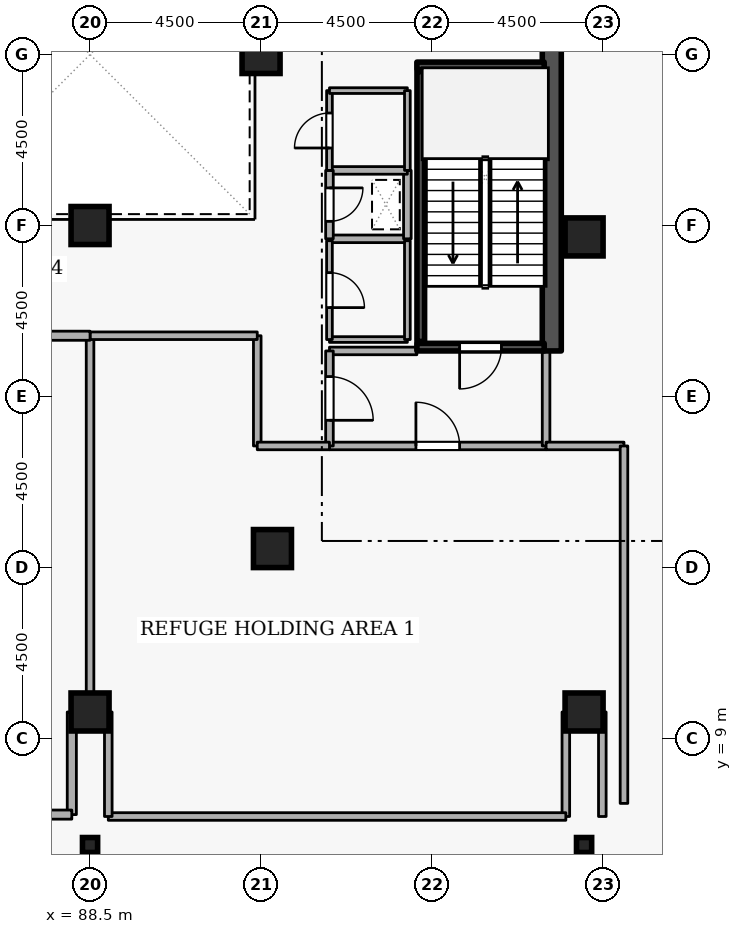
"""IFC4 building model, lengths in metres.
Left out: names, types, materials, properties, quantities, classifications, styles, units other than length and angle.
Written with IfcOpenShell. Run it as: python <this file> out.ifc"""

import sys

from ifc_helpers import new_model, si_unit, direction, frame, frame_2d, origin, origin_2d, place, context, subcontext, project, spatial, rectangle, i_section, extrude, element, fill, save


model = new_model("IFC4")
c1 = context("Model", 3, precision=1e-05, world=origin(), true_north=direction((0.0, 1.0)))
c2 = subcontext(c1, "Body", "Model", "MODEL_VIEW")
j1 = project(units=[si_unit("LENGTHUNIT", "METRE"), si_unit("PLANEANGLEUNIT", "RADIAN")], contexts=[c1])
p1 = place(None, origin())
s1 = spatial("IfcSite", under=j1, at=p1, CompositionType="ELEMENT")
p2 = place(p1, origin())
s2 = spatial("IfcBuilding", under=s1, at=p2, CompositionType="ELEMENT")
p3 = place(p2, frame((0.0, 0.0, 221.7)))
s3 = spatial("IfcBuildingStorey", under=s2, at=p3, CompositionType="ELEMENT", Elevation=221.7)
p4 = place(p3, frame((100.65, 19.2, 0.0), z_axis=(0.0, 0.0, 1.0), x_axis=(0.0, 1.0, 0.0)))
e1 = element("IfcWall", 1, at=p4, inside=s3, PredefinedType="SHEAR", context=c2, shape_type="SweptSolid", body=[
    extrude(rectangle(XDim=15.6, YDim=0.5, at=frame_2d((7.8, 0.0))), origin(), (0.0, 0.0, 1.0), 4.2),
])
for number, where, z_axis, x_axis in (
    (2, (101.5, 9.7, 0.0), (0.0, 0.0, 1.0), (1.0, 0.0, 0.0)),
    (3, (88.5, 9.7, 0.0), (0.0, 0.0, 1.0), (1.0, 0.0, 0.0)),
    (4, (93.3, 14.0, 0.0), (0.0, 0.0, 1.0), (1.0, 0.0, 0.0)),
    (5, (101.5, 22.2, 0.0), (0.0, 0.0, 1.0), (1.0, 0.0, 0.0)),
    (6, (93.0, 27.0, 0.0), (0.0, 0.0, 1.0), (1.0, 0.0, 0.0)),
    (7, (88.5, 22.5, 0.0), (0.0, 0.0, 1.0), (1.0, 0.0, 0.0)),
):
    element("IfcColumn", number, at=place(p3, frame(where, z_axis=z_axis, x_axis=x_axis)), inside=s3, PredefinedType="COLUMN", context=c2, shape_type="SweptSolid", body=[
        extrude(rectangle(XDim=1.0, YDim=1.0, at=origin_2d()), origin(), (0.0, 0.0, 1.0), 4.2),
    ])
for number, where, z_axis, x_axis in (
    (8, (101.5, 6.2, 0.0), (0.0, 0.0, 1.0), (1.0, 0.0, 0.0)),
    (9, (88.5, 6.2, 0.0), (0.0, 0.0, 1.0), (1.0, 0.0, 0.0)),
):
    element("IfcColumn", number, at=place(p3, frame(where, z_axis=z_axis, x_axis=x_axis)), inside=s3, PredefinedType="COLUMN", context=c2, shape_type="SweptSolid", body=[
        extrude(i_section(OverallWidth=0.399, OverallDepth=0.394, WebThickness=0.023, FlangeThickness=0.037, FilletRadius=0.015, at=origin_2d()), origin(), (0.0, 0.0, 1.0), 4.2),
    ])
p5 = place(p3, frame((100.45, 19.3, 0.0), z_axis=(0.0, 0.0, 1.0), x_axis=(-1.0, 0.0, 0.0)))
e10 = element("IfcWall", 10, at=p5, inside=s3, PredefinedType="SHEAR", context=c2, shape_type="SweptSolid", body=[
    extrude(rectangle(XDim=3.35, YDim=0.2, at=frame_2d((1.675, 0.0))), origin(), (0.0, 0.0, 1.0), 4.2),
])
p6 = place(p5, frame((1.125, 0.0, 0.0)))
e11 = element("IfcOpeningElement", 11, at=p6, cuts=e10, PredefinedType="OPENING", context=c2, shape_type="SweptSolid", body=[
    extrude(rectangle(XDim=1.1, YDim=2.1, at=frame_2d((0.55, 1.05))), frame((0.0, 0.11, 0.0), z_axis=(0.0, -1.0, 0.0), x_axis=(1.0, 0.0, 0.0)), (0.0, 0.0, 1.0), 0.22),
])
p7 = place(p3, frame((97.1, 26.7, 0.0), z_axis=(0.0, 0.0, 1.0), x_axis=(1.0, 0.0, 0.0)))
e12 = element("IfcWall", 12, at=p7, inside=s3, PredefinedType="SHEAR", context=c2, shape_type="SweptSolid", body=[
    extrude(rectangle(XDim=3.35, YDim=0.2, at=frame_2d((1.675, 0.0))), origin(), (0.0, 0.0, 1.0), 4.2),
])
p8 = place(p3, frame((97.203, 26.55, 0.0), z_axis=(0.0, 0.0, 1.0), x_axis=(0.0, -1.0, 0.0)))
e13 = element("IfcWall", 13, at=p8, inside=s3, PredefinedType="SHEAR", context=c2, shape_type="SweptSolid", body=[
    extrude(rectangle(XDim=7.1, YDim=0.2, at=frame_2d((3.55, 0.0))), origin(), (0.0, 0.0, 1.0), 4.2),
])
p9 = place(p3, frame((94.8, 16.7, 0.0), z_axis=(0.0, 0.0, 1.0), x_axis=(1.0, 0.0, 0.0)))
e14 = element("IfcWall", 14, at=p9, inside=s3, PredefinedType="STANDARD", context=c2, shape_type="SweptSolid", body=[
    extrude(rectangle(XDim=5.7, YDim=0.2, at=frame_2d((2.85, 0.0))), origin(), (0.0, 0.0, 1.0), 3.94),
])
p10 = place(p9, frame((2.275, 0.0, 0.0)))
e15 = element("IfcOpeningElement", 15, at=p10, cuts=e14, PredefinedType="OPENING", context=c2, shape_type="SweptSolid", body=[
    extrude(rectangle(XDim=1.15, YDim=2.1, at=frame_2d((0.575, 1.05))), frame((0.0, 0.11, 0.0), z_axis=(0.0, -1.0, 0.0), x_axis=(1.0, 0.0, 0.0)), (0.0, 0.0, 1.0), 0.22),
])
p11 = place(p3, frame((100.5, 16.7, 0.0), z_axis=(0.0, 0.0, 1.0), x_axis=(0.0, 1.0, 0.0)))
e16 = element("IfcWall", 16, at=p11, inside=s3, PredefinedType="STANDARD", context=c2, shape_type="SweptSolid", body=[
    extrude(rectangle(XDim=2.5, YDim=0.2, at=frame_2d((1.25, 0.0))), origin(), (0.0, 0.0, 1.0), 3.94),
])
p12 = place(p3, frame((97.1, 19.2, 0.0), z_axis=(0.0, 0.0, 1.0), x_axis=(-1.0, 0.0, 0.0)))
e17 = element("IfcWall", 17, at=p12, inside=s3, PredefinedType="STANDARD", context=c2, shape_type="SweptSolid", body=[
    extrude(rectangle(XDim=2.3, YDim=0.2, at=frame_2d((1.15, 0.0))), origin(), (0.0, 0.0, 1.0), 3.145),
])
p13 = place(p3, frame((94.8, 19.2, 0.0), z_axis=(0.0, 0.0, 1.0), x_axis=(0.0, -1.0, 0.0)))
e18 = element("IfcWall", 18, at=p13, inside=s3, PredefinedType="STANDARD", context=c2, shape_type="SweptSolid", body=[
    extrude(rectangle(XDim=2.5, YDim=0.2, at=frame_2d((1.25, 0.0))), origin(), (0.0, 0.0, 1.0), 3.94),
])
p14 = place(p13, frame((0.675, 0.0, 0.0)))
e19 = element("IfcOpeningElement", 19, at=p14, cuts=e18, PredefinedType="OPENING", context=c2, shape_type="SweptSolid", body=[
    extrude(rectangle(XDim=1.15, YDim=2.1, at=frame_2d((0.575, 1.05))), frame((0.0, 0.11, 0.0), z_axis=(0.0, -1.0, 0.0), x_axis=(1.0, 0.0, 0.0)), (0.0, 0.0, 1.0), 0.22),
])
p15 = place(p3, frame((94.8, 22.15, 0.0), z_axis=(0.0, 0.0, 1.0), x_axis=(1.0, 0.0, 0.0)))
e20 = element("IfcWall", 20, at=p15, inside=s3, PredefinedType="STANDARD", context=c2, shape_type="SweptSolid", body=[
    extrude(rectangle(XDim=2.05, YDim=0.2, at=frame_2d((1.025, 0.0))), origin(), (0.0, 0.0, 1.0), 3.94),
])
p16 = place(p3, frame((96.85, 22.15, 0.0), z_axis=(0.0, 0.0, 1.0), x_axis=(0.0, 1.0, 0.0)))
e21 = element("IfcWall", 21, at=p16, inside=s3, PredefinedType="STANDARD", context=c2, shape_type="SweptSolid", body=[
    extrude(rectangle(XDim=1.8, YDim=0.2, at=frame_2d((0.9, 0.0))), origin(), (0.0, 0.0, 1.0), 3.94),
])
p17 = place(p3, frame((96.85, 23.95, 0.0), z_axis=(0.0, 0.0, 1.0), x_axis=(-1.0, 0.0, 0.0)))
e22 = element("IfcWall", 22, at=p17, inside=s3, PredefinedType="STANDARD", context=c2, shape_type="SweptSolid", body=[
    extrude(rectangle(XDim=2.05, YDim=0.2, at=frame_2d((1.025, 0.0))), origin(), (0.0, 0.0, 1.0), 3.94),
])
p18 = place(p3, frame((94.8, 23.95, 0.0), z_axis=(0.0, 0.0, 1.0), x_axis=(0.0, -1.0, 0.0)))
e23 = element("IfcWall", 23, at=p18, inside=s3, PredefinedType="STANDARD", context=c2, shape_type="SweptSolid", body=[
    extrude(rectangle(XDim=1.8, YDim=0.2, at=frame_2d((0.9, 0.0))), origin(), (0.0, 0.0, 1.0), 3.94),
])
p19 = place(p18, frame((0.46, 0.0, 0.0)))
e24 = element("IfcOpeningElement", 24, at=p19, cuts=e23, PredefinedType="OPENING", context=c2, shape_type="SweptSolid", body=[
    extrude(rectangle(XDim=0.88, YDim=2.04, at=frame_2d((0.44, 1.02))), frame((0.0, 0.11, 0.0), z_axis=(0.0, -1.0, 0.0), x_axis=(1.0, 0.0, 0.0)), (0.0, 0.0, 1.0), 0.22),
])
p20 = place(p3, frame((92.9, 19.6, 0.0), z_axis=(0.0, 0.0, 1.0), x_axis=(0.0, -1.0, 0.0)))
e25 = element("IfcWall", 25, at=p20, inside=s3, PredefinedType="STANDARD", context=c2, shape_type="SweptSolid", body=[
    extrude(rectangle(XDim=2.9, YDim=0.2, at=frame_2d((1.45, 0.0))), origin(), (0.0, 0.0, 1.0), 3.94),
])
p21 = place(p3, frame((92.9, 16.7, 0.0), z_axis=(0.0, 0.0, 1.0), x_axis=(1.0, 0.0, 0.0)))
e26 = element("IfcWall", 26, at=p21, inside=s3, PredefinedType="STANDARD", context=c2, shape_type="SweptSolid", body=[
    extrude(rectangle(XDim=1.9, YDim=0.2, at=frame_2d((0.95, 0.0))), origin(), (0.0, 0.0, 1.0), 3.94),
])
p22 = place(p3, frame((100.5, 16.7, 0.0), z_axis=(0.0, 0.0, 1.0), x_axis=(1.0, 0.0, 0.0)))
e27 = element("IfcWall", 27, at=p22, inside=s3, PredefinedType="STANDARD", context=c2, shape_type="SweptSolid", body=[
    extrude(rectangle(XDim=2.05, YDim=0.2, at=frame_2d((1.025, 0.0))), origin(), (0.0, 0.0, 1.0), 3.94),
])
p23 = place(p3, frame((102.55, 16.7, 0.0), z_axis=(0.0, 0.0, 1.0), x_axis=(0.0, -1.0, 0.0)))
e28 = element("IfcWall", 28, at=p23, inside=s3, PredefinedType="STANDARD", context=c2, shape_type="SweptSolid", body=[
    extrude(rectangle(XDim=9.405, YDim=0.2, at=frame_2d((4.703, 0.0))), origin(), (0.0, 0.0, 1.0), 3.94),
])
for number, where, z_axis, x_axis in (
    (29, (101.98, 6.95, 0.0), (0.0, 0.0, 1.0), (0.0, 1.0, 0.0)),
    (30, (101.02, 9.7, 0.0), (0.0, 0.0, 1.0), (0.0, -1.0, 0.0)),
):
    element("IfcWall", number, at=place(p3, frame(where, z_axis=z_axis, x_axis=x_axis)), inside=s3, PredefinedType="STANDARD", context=c2, shape_type="SweptSolid", body=[
        extrude(rectangle(XDim=2.75, YDim=0.2, at=frame_2d((1.375, 0.0))), origin(), (0.0, 0.0, 1.0), 3.94),
    ])
p24 = place(p3, frame((101.02, 6.95, 0.0), z_axis=(0.0, 0.0, 1.0), x_axis=(-1.0, 0.0, 0.0)))
e31 = element("IfcWall", 31, at=p24, inside=s3, PredefinedType="STANDARD", context=c2, shape_type="SweptSolid", body=[
    extrude(rectangle(XDim=12.04, YDim=0.2, at=frame_2d((6.02, 0.0))), origin(), (0.0, 0.0, 1.0), 3.94),
])
p25 = place(p3, frame((88.98, 6.95, 0.0), z_axis=(0.0, 0.0, 1.0), x_axis=(0.0, 1.0, 0.0)))
e32 = element("IfcWall", 32, at=p25, inside=s3, PredefinedType="STANDARD", context=c2, shape_type="SweptSolid", body=[
    extrude(rectangle(XDim=2.75, YDim=0.2, at=frame_2d((1.375, 0.0))), origin(), (0.0, 0.0, 1.0), 3.94),
])
p26 = place(p3, frame((88.5, 9.7, 0.0), z_axis=(0.0, 0.0, 1.0), x_axis=(0.0, 1.0, 0.0)))
e33 = element("IfcWall", 33, at=p26, inside=s3, PredefinedType="STANDARD", context=c2, shape_type="SweptSolid", body=[
    extrude(rectangle(XDim=9.9, YDim=0.2, at=frame_2d((4.95, 0.0))), origin(), (0.0, 0.0, 1.0), 3.325),
])
p27 = place(p3, frame((88.5, 19.6, 0.0), z_axis=(0.0, 0.0, 1.0), x_axis=(1.0, 0.0, 0.0)))
e34 = element("IfcWall", 34, at=p27, inside=s3, PredefinedType="STANDARD", context=c2, shape_type="SweptSolid", body=[
    extrude(rectangle(XDim=4.4, YDim=0.2, at=frame_2d((2.2, 0.0))), origin(), (0.0, 0.0, 1.0), 3.145),
])
p28 = place(p3, frame((84.1, 19.6, 0.0), z_axis=(0.0, 0.0, 1.0), x_axis=(1.0, 0.0, 0.0)))
e35 = element("IfcWall", 35, at=p28, inside=s3, PredefinedType="STANDARD", context=c2, shape_type="SweptSolid", body=[
    extrude(rectangle(XDim=4.4, YDim=0.24, at=frame_2d((2.2, 0.0))), origin(), (0.0, 0.0, 1.0), 3.145),
])
p29 = place(p28, frame((1.6, 0.0, 0.0)))
e36 = element("IfcOpeningElement", 36, at=p29, cuts=e35, PredefinedType="OPENING", context=c2, shape_type="SweptSolid", body=[
    extrude(rectangle(XDim=1.2, YDim=2.1, at=frame_2d((0.6, 1.05))), frame((0.0, 0.13, 0.0), z_axis=(0.0, -1.0, 0.0), x_axis=(1.0, 0.0, 0.0)), (0.0, 0.0, 1.0), 0.26),
])
p30 = place(p3, frame((88.02, 9.7, 0.0), z_axis=(0.0, 0.0, 1.0), x_axis=(0.0, -1.0, 0.0)))
e37 = element("IfcWall", 37, at=p30, inside=s3, PredefinedType="STANDARD", context=c2, shape_type="SweptSolid", body=[
    extrude(rectangle(XDim=2.7, YDim=0.24, at=frame_2d((1.35, 0.0))), origin(), (0.0, 0.0, 1.0), 3.94),
])
p31 = place(p3, frame((88.02, 7.0, 0.0), z_axis=(0.0, 0.0, 1.0), x_axis=(-1.0, 0.0, 0.0)))
e38 = element("IfcWall", 38, at=p31, inside=s3, PredefinedType="STANDARD", context=c2, shape_type="SweptSolid", body=[
    extrude(rectangle(XDim=3.92, YDim=0.24, at=frame_2d((1.96, 0.0))), origin(), (0.0, 0.0, 1.0), 3.94),
])
p32 = place(p3, frame((94.8, 19.5, 0.0), z_axis=(0.0, 0.0, 1.0), x_axis=(1.0, 0.0, 0.0)))
e39 = element("IfcWall", 39, at=p32, inside=s3, PredefinedType="PARTITIONING", context=c2, shape_type="SweptSolid", body=[
    extrude(rectangle(XDim=2.05, YDim=0.15, at=frame_2d((1.025, 0.0))), origin(), (0.0, 0.0, 1.0), 3.145),
])
p33 = place(p3, frame((96.85, 19.5, 0.0), z_axis=(0.0, 0.0, 1.0), x_axis=(0.0, 1.0, 0.0)))
e40 = element("IfcWall", 40, at=p33, inside=s3, PredefinedType="PARTITIONING", context=c2, shape_type="SweptSolid", body=[
    extrude(rectangle(XDim=2.6, YDim=0.15, at=frame_2d((1.3, 0.0))), origin(), (0.0, 0.0, 1.0), 3.94),
])
p34 = place(p3, frame((94.8, 22.1, 0.0), z_axis=(0.0, 0.0, 1.0), x_axis=(0.0, -1.0, 0.0)))
e41 = element("IfcWall", 41, at=p34, inside=s3, PredefinedType="PARTITIONING", context=c2, shape_type="SweptSolid", body=[
    extrude(rectangle(XDim=2.6, YDim=0.15, at=frame_2d((1.3, 0.0))), origin(), (0.0, 0.0, 1.0), 3.94),
])
p35 = place(p34, frame((0.84, 0.0, 0.0)))
e42 = element("IfcOpeningElement", 42, at=p35, cuts=e41, PredefinedType="OPENING", context=c2, shape_type="SweptSolid", body=[
    extrude(rectangle(XDim=0.92, YDim=2.08, at=frame_2d((0.46, 1.04))), frame((0.0, 0.085, 0.0), z_axis=(0.0, -1.0, 0.0), x_axis=(1.0, 0.0, 0.0)), (0.0, 0.0, 1.0), 0.17),
])
p36 = place(p3, frame((94.8, 23.95, 0.0), z_axis=(0.0, 0.0, 1.0), x_axis=(0.0, 1.0, 0.0)))
e43 = element("IfcWall", 43, at=p36, inside=s3, PredefinedType="PARTITIONING", context=c2, shape_type="SweptSolid", body=[
    extrude(rectangle(XDim=2.1, YDim=0.15, at=frame_2d((1.05, 0.0))), origin(), (0.0, 0.0, 1.0), 3.94),
])
p37 = place(p36, frame((0.59, 0.0, 0.0)))
e44 = element("IfcOpeningElement", 44, at=p37, cuts=e43, PredefinedType="OPENING", context=c2, shape_type="SweptSolid", body=[
    extrude(rectangle(XDim=0.92, YDim=2.08, at=frame_2d((0.46, 1.04))), frame((0.0, 0.085, 0.0), z_axis=(0.0, -1.0, 0.0), x_axis=(1.0, 0.0, 0.0)), (0.0, 0.0, 1.0), 0.17),
])
p38 = place(p3, frame((94.8, 26.05, 0.0), z_axis=(0.0, 0.0, 1.0), x_axis=(1.0, 0.0, 0.0)))
e45 = element("IfcWall", 45, at=p38, inside=s3, PredefinedType="PARTITIONING", context=c2, shape_type="SweptSolid", body=[
    extrude(rectangle(XDim=2.05, YDim=0.15, at=frame_2d((1.025, 0.0))), origin(), (0.0, 0.0, 1.0), 3.94),
])
p39 = place(p3, frame((96.85, 26.05, 0.0), z_axis=(0.0, 0.0, 1.0), x_axis=(0.0, -1.0, 0.0)))
e46 = element("IfcWall", 46, at=p39, inside=s3, PredefinedType="PARTITIONING", context=c2, shape_type="SweptSolid", body=[
    extrude(rectangle(XDim=2.1, YDim=0.15, at=frame_2d((1.05, 0.0))), origin(), (0.0, 0.0, 1.0), 3.94),
])
p40 = place(p6, origin())
e47 = element("IfcDoor", 47, at=p40, inside=s3, OperationType="SINGLE_SWING_RIGHT", PredefinedType="DOOR", context=c2, shape_type="SweptSolid", body=[
    extrude(rectangle(XDim=1.1, YDim=2.1, at=frame_2d((0.55, 1.05))), frame((0.0, 0.025, 0.0), z_axis=(0.0, -1.0, 0.0), x_axis=(1.0, 0.0, 0.0)), (0.0, 0.0, 1.0), 0.05),
])
fill(e11, e47)
p41 = place(p14, origin())
e48 = element("IfcDoor", 48, at=p41, inside=s3, OperationType="SINGLE_SWING_RIGHT", PredefinedType="DOOR", context=c2, shape_type="SweptSolid", body=[
    extrude(rectangle(XDim=1.15, YDim=2.1, at=frame_2d((0.575, 1.05))), frame((0.0, 0.025, 0.0), z_axis=(0.0, -1.0, 0.0), x_axis=(1.0, 0.0, 0.0)), (0.0, 0.0, 1.0), 0.05),
])
fill(e19, e48)
p42 = place(p19, origin())
e49 = element("IfcDoor", 49, at=p42, inside=s3, OperationType="SINGLE_SWING_LEFT", PredefinedType="DOOR", context=c2, shape_type="SweptSolid", body=[
    extrude(rectangle(XDim=0.88, YDim=2.04, at=frame_2d((0.44, 1.02))), frame((0.0, 0.025, 0.0), z_axis=(0.0, -1.0, 0.0), x_axis=(1.0, 0.0, 0.0)), (0.0, 0.0, 1.0), 0.05),
])
fill(e24, e49)
p43 = place(p35, origin())
e50 = element("IfcDoor", 50, at=p43, inside=s3, OperationType="SINGLE_SWING_RIGHT", PredefinedType="DOOR", context=c2, shape_type="SweptSolid", body=[
    extrude(rectangle(XDim=0.92, YDim=2.08, at=frame_2d((0.46, 1.04))), frame((0.0, 0.025, 0.0), z_axis=(0.0, -1.0, 0.0), x_axis=(1.0, 0.0, 0.0)), (0.0, 0.0, 1.0), 0.05),
])
fill(e42, e50)
p44 = place(p37, origin())
e51 = element("IfcDoor", 51, at=p44, inside=s3, OperationType="SINGLE_SWING_LEFT", PredefinedType="DOOR", context=c2, shape_type="SweptSolid", body=[
    extrude(rectangle(XDim=0.92, YDim=2.08, at=frame_2d((0.46, 1.04))), frame((0.0, 0.025, 0.0), z_axis=(0.0, -1.0, 0.0), x_axis=(1.0, 0.0, 0.0)), (0.0, 0.0, 1.0), 0.05),
])
fill(e44, e51)
p45 = place(p10, origin())
e52 = element("IfcDoor", 52, at=p45, inside=s3, OperationType="SINGLE_SWING_LEFT", PredefinedType="DOOR", context=c2, shape_type="SweptSolid", body=[
    extrude(rectangle(XDim=1.15, YDim=2.1, at=frame_2d((0.575, 1.05))), frame((0.0, 0.025, 0.0), z_axis=(0.0, -1.0, 0.0), x_axis=(1.0, 0.0, 0.0)), (0.0, 0.0, 1.0), 0.05),
])
fill(e15, e52)
save(model, sys.argv[1])
